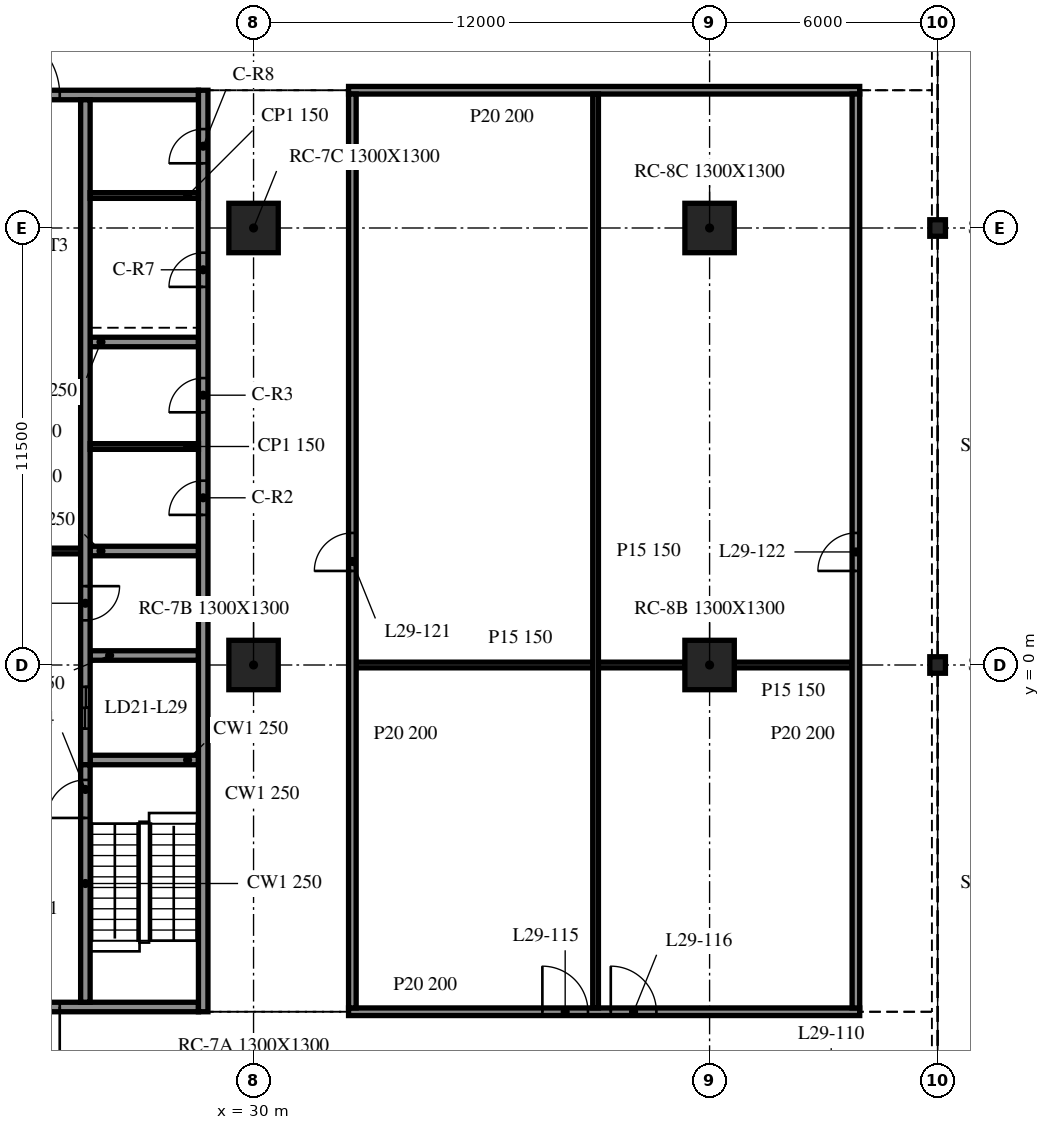
"""IFC4 building model, lengths in metres.
Left out: names, types, materials, properties, quantities, classifications, styles, units other than length and angle.
Written with IfcOpenShell. Run it as: python <this file> out.ifc"""

import sys

from ifc_helpers import new_model, si_unit, direction, frame, frame_2d, origin, origin_2d, place, context, subcontext, project, spatial, rectangle, i_section, extrude, element, fill, save


model = new_model("IFC4")
c1 = context("Model", 3, precision=1e-05, world=origin(), true_north=direction((0.0, 1.0)))
c2 = subcontext(c1, "Body", "Model", "MODEL_VIEW")
j1 = project(units=[si_unit("LENGTHUNIT", "METRE"), si_unit("PLANEANGLEUNIT", "RADIAN")], contexts=[c1])
p1 = place(None, origin())
s1 = spatial("IfcSite", under=j1, at=p1, CompositionType="ELEMENT")
p2 = place(p1, origin())
s2 = spatial("IfcBuilding", under=s1, at=p2, CompositionType="ELEMENT")
p3 = place(p2, frame((0.0, 0.0, 126.1)))
s3 = spatial("IfcBuildingStorey", under=s2, at=p3, CompositionType="ELEMENT", Elevation=126.1)
for number, where, z_axis, x_axis in (
    (1, (30.0, 0.0, -0.34), (0.0, 0.0, 1.0), (1.0, 0.0, 0.0)),
    (2, (30.0, 11.5, -0.34), (0.0, 0.0, 1.0), (1.0, 0.0, 0.0)),
    (3, (42.0, 0.0, -0.34), (0.0, 0.0, 1.0), (1.0, 0.0, 0.0)),
    (4, (42.0, 11.5, -0.34), (0.0, 0.0, 1.0), (1.0, 0.0, 0.0)),
):
    element("IfcColumn", number, at=place(p3, frame(where, z_axis=z_axis, x_axis=x_axis)), inside=s3, PredefinedType="COLUMN", context=c2, shape_type="SweptSolid", body=[
        extrude(rectangle(XDim=1.3, YDim=1.3, at=origin_2d()), origin(), (0.0, 0.0, 1.0), 4.1),
    ])
for number, where, z_axis, x_axis in (
    (5, (48.0, 0.0, -0.34), (0.0, 0.0, 1.0), (1.0, 0.0, 0.0)),
    (6, (48.0, 11.5, -0.34), (0.0, 0.0, 1.0), (1.0, 0.0, 0.0)),
):
    element("IfcColumn", number, at=place(p3, frame(where, z_axis=z_axis, x_axis=x_axis)), inside=s3, PredefinedType="COLUMN", context=c2, shape_type="SweptSolid", body=[
        extrude(i_section(OverallWidth=0.412, OverallDepth=0.434, WebThickness=0.036, FlangeThickness=0.057, at=origin_2d()), origin(), (0.0, 0.0, 1.0), 4.1),
    ])
p4 = place(p3, frame((28.675, -9.125, 0.0), z_axis=(0.0, 0.0, 1.0), x_axis=(0.0, 1.0, 0.0)))
e7 = element("IfcWall", 7, at=p4, inside=s3, PredefinedType="SOLIDWALL", context=c2, shape_type="SweptSolid", body=[
    extrude(rectangle(XDim=24.25, YDim=0.25, at=frame_2d((12.125, 0.0))), origin(), (0.0, 0.0, 1.0), 3.76),
])
p5 = place(p4, frame((13.075, 0.0, 0.0)))
e8 = element("IfcOpeningElement", 8, at=p5, cuts=e7, PredefinedType="OPENING", context=c2, shape_type="SweptSolid", body=[
    extrude(rectangle(XDim=0.9, YDim=2.1, at=frame_2d((0.45, 1.05))), frame((0.0, 0.135, 0.0), z_axis=(0.0, -1.0, 0.0), x_axis=(1.0, 0.0, 0.0)), (0.0, 0.0, 1.0), 0.27),
])
p6 = place(p4, frame((15.775, 0.0, 0.0)))
e9 = element("IfcOpeningElement", 9, at=p6, cuts=e7, PredefinedType="OPENING", context=c2, shape_type="SweptSolid", body=[
    extrude(rectangle(XDim=0.9, YDim=2.1, at=frame_2d((0.45, 1.05))), frame((0.0, 0.135, 0.0), z_axis=(0.0, -1.0, 0.0), x_axis=(1.0, 0.0, 0.0)), (0.0, 0.0, 1.0), 0.27),
])
p7 = place(p4, frame((19.075, 0.0, 0.0)))
e10 = element("IfcOpeningElement", 10, at=p7, cuts=e7, PredefinedType="OPENING", context=c2, shape_type="SweptSolid", body=[
    extrude(rectangle(XDim=0.9, YDim=2.1, at=frame_2d((0.45, 1.05))), frame((0.0, 0.135, 0.0), z_axis=(0.0, -1.0, 0.0), x_axis=(1.0, 0.0, 0.0)), (0.0, 0.0, 1.0), 0.27),
])
p8 = place(p4, frame((22.327, 0.0, 0.0)))
e11 = element("IfcOpeningElement", 11, at=p8, cuts=e7, PredefinedType="OPENING", context=c2, shape_type="SweptSolid", body=[
    extrude(rectangle(XDim=0.9, YDim=2.1, at=frame_2d((0.45, 1.05))), frame((0.0, 0.135, 0.0), z_axis=(0.0, -1.0, 0.0), x_axis=(1.0, 0.0, 0.0)), (0.0, 0.0, 1.0), 0.27),
])
p9 = place(p3, frame((28.55, -9.0, 0.0), z_axis=(0.0, 0.0, 1.0), x_axis=(-1.0, 0.0, 0.0)))
e12 = element("IfcWall", 12, at=p9, inside=s3, PredefinedType="SOLIDWALL", context=c2, shape_type="SweptSolid", body=[
    extrude(rectangle(XDim=9.1, YDim=0.25, at=frame_2d((4.55, 0.0))), origin(), (0.0, 0.0, 1.0), 3.76),
])
p10 = place(p9, frame((3.65, 0.0, 0.0)))
e13 = element("IfcOpeningElement", 13, at=p10, cuts=e12, PredefinedType="OPENING", context=c2, shape_type="SweptSolid", body=[
    extrude(rectangle(XDim=1.8, YDim=2.1, at=frame_2d((0.9, 1.05))), frame((0.0, 0.135, 0.0), z_axis=(0.0, -1.0, 0.0), x_axis=(1.0, 0.0, 0.0)), (0.0, 0.0, 1.0), 0.27),
])
p11 = place(p3, frame((19.45, 15.0, 0.0), z_axis=(0.0, 0.0, 1.0), x_axis=(1.0, 0.0, 0.0)))
e14 = element("IfcWall", 14, at=p11, inside=s3, PredefinedType="SOLIDWALL", context=c2, shape_type="SweptSolid", body=[
    extrude(rectangle(XDim=9.1, YDim=0.25, at=frame_2d((4.55, 0.0))), origin(), (0.0, 0.0, 1.0), 3.76),
])
p12 = place(p11, frame((3.65, 0.0, 0.0)))
e15 = element("IfcOpeningElement", 15, at=p12, cuts=e14, PredefinedType="OPENING", context=c2, shape_type="SweptSolid", body=[
    extrude(rectangle(XDim=1.8, YDim=2.1, at=frame_2d((0.9, 1.05))), frame((0.0, 0.135, 0.0), z_axis=(0.0, -1.0, 0.0), x_axis=(1.0, 0.0, 0.0)), (0.0, 0.0, 1.0), 0.27),
])
p13 = place(p3, frame((25.575, -8.875, 0.0), z_axis=(0.0, 0.0, 1.0), x_axis=(0.0, 1.0, 0.0)))
e16 = element("IfcWall", 16, at=p13, inside=s3, PredefinedType="SOLIDWALL", context=c2, shape_type="SweptSolid", body=[
    extrude(rectangle(XDim=6.25, YDim=0.25, at=frame_2d((3.125, 0.0))), origin(), (0.0, 0.0, 1.0), 3.76),
])
p14 = place(p13, frame((4.85, 0.0, 0.0)))
e17 = element("IfcOpeningElement", 17, at=p14, cuts=e16, PredefinedType="OPENING", context=c2, shape_type="SweptSolid", body=[
    extrude(rectangle(XDim=1.0, YDim=2.1, at=frame_2d((0.5, 1.05))), frame((0.0, 0.135, 0.0), z_axis=(0.0, -1.0, 0.0), x_axis=(1.0, 0.0, 0.0)), (0.0, 0.0, 1.0), 0.27),
])
p15 = place(p3, frame((25.575, 14.875, 0.0), z_axis=(0.0, 0.0, 1.0), x_axis=(0.0, -1.0, 0.0)))
e18 = element("IfcWall", 18, at=p15, inside=s3, PredefinedType="SOLIDWALL", context=c2, shape_type="SweptSolid", body=[
    extrude(rectangle(XDim=17.5, YDim=0.25, at=frame_2d((8.75, 0.0))), origin(), (0.0, 0.0, 1.0), 3.76),
])
p16 = place(p15, frame((15.45, 0.0, 0.0)))
e19 = element("IfcOpeningElement", 19, at=p16, cuts=e18, PredefinedType="OPENING", context=c2, shape_type="SweptSolid", body=[
    extrude(rectangle(XDim=1.1, YDim=2.1, at=frame_2d((0.55, 1.05))), frame((0.0, 0.135, 0.0), z_axis=(0.0, -1.0, 0.0), x_axis=(1.0, 0.0, 0.0)), (0.0, 0.0, 1.0), 0.27),
])
p17 = place(p15, frame((12.8, 0.0, 0.0)))
e20 = element("IfcOpeningElement", 20, at=p17, cuts=e18, PredefinedType="OPENING", context=c2, shape_type="SweptSolid", body=[
    extrude(rectangle(XDim=0.9, YDim=2.1, at=frame_2d((0.45, 1.05))), frame((0.0, 0.135, 0.0), z_axis=(0.0, -1.0, 0.0), x_axis=(1.0, 0.0, 0.0)), (0.0, 0.0, 1.0), 0.27),
])
for number, where, z_axis, x_axis in (
    (21, (25.7, -2.5, 0.0), (0.0, 0.0, 1.0), (1.0, 0.0, 0.0)),
    (22, (25.7, 0.25, 0.0), (0.0, 0.0, 1.0), (1.0, 0.0, 0.0)),
    (23, (25.7, 3.0, 0.0), (0.0, 0.0, 1.0), (1.0, 0.0, 0.0)),
    (24, (25.7, 8.5, 0.0), (0.0, 0.0, 1.0), (1.0, 0.0, 0.0)),
):
    element("IfcWall", number, at=place(p3, frame(where, z_axis=z_axis, x_axis=x_axis)), inside=s3, PredefinedType="SOLIDWALL", context=c2, shape_type="SweptSolid", body=[
        extrude(rectangle(XDim=2.85, YDim=0.25, at=frame_2d((1.425, 0.0))), origin(), (0.0, 0.0, 1.0), 3.76),
    ])
p18 = place(p3, frame((22.55, 3.0, 0.0), z_axis=(0.0, 0.0, 1.0), x_axis=(1.0, 0.0, 0.0)))
e25 = element("IfcWall", 25, at=p18, inside=s3, PredefinedType="PARTITIONING", context=c2, shape_type="SweptSolid", body=[
    extrude(rectangle(XDim=2.9, YDim=0.15, at=frame_2d((1.45, 0.0))), origin(), (0.0, 0.0, 1.0), 3.76),
])
for number, where, z_axis, x_axis in (
    (26, (25.7, 5.75, 0.0), (0.0, 0.0, 1.0), (1.0, 0.0, 0.0)),
    (27, (25.7, 12.355, 0.0), (0.0, 0.0, 1.0), (1.0, 0.0, 0.0)),
):
    element("IfcWall", number, at=place(p3, frame(where, z_axis=z_axis, x_axis=x_axis)), inside=s3, PredefinedType="PARTITIONING", context=c2, shape_type="SweptSolid", body=[
        extrude(rectangle(XDim=2.85, YDim=0.15, at=frame_2d((1.425, 0.0))), origin(), (0.0, 0.0, 1.0), 3.76),
    ])
p19 = place(p3, frame((32.5, -9.125, 0.0), z_axis=(0.0, 0.0, 1.0), x_axis=(1.0, 0.0, 0.0)))
e28 = element("IfcWall", 28, at=p19, inside=s3, PredefinedType="PARTITIONING", context=c2, shape_type="SweptSolid", body=[
    extrude(rectangle(XDim=13.45, YDim=0.2, at=frame_2d((6.725, 0.0))), origin(), (0.0, 0.0, 1.0), 3.76),
])
p20 = place(p19, frame((5.1, 0.0, 0.0)))
e29 = element("IfcOpeningElement", 29, at=p20, cuts=e28, PredefinedType="OPENING", context=c2, shape_type="SweptSolid", body=[
    extrude(rectangle(XDim=1.2, YDim=2.1, at=frame_2d((0.6, 1.05))), frame((0.0, 0.11, 0.0), z_axis=(0.0, -1.0, 0.0), x_axis=(1.0, 0.0, 0.0)), (0.0, 0.0, 1.0), 0.22),
])
p21 = place(p19, frame((6.9, 0.0, 0.0)))
e30 = element("IfcOpeningElement", 30, at=p21, cuts=e28, PredefinedType="OPENING", context=c2, shape_type="SweptSolid", body=[
    extrude(rectangle(XDim=1.2, YDim=2.1, at=frame_2d((0.6, 1.05))), frame((0.0, 0.11, 0.0), z_axis=(0.0, -1.0, 0.0), x_axis=(1.0, 0.0, 0.0)), (0.0, 0.0, 1.0), 0.22),
])
p22 = place(p3, frame((32.7, 0.0, 0.0), z_axis=(0.0, 0.0, 1.0), x_axis=(1.0, 0.0, 0.0)))
e31 = element("IfcWall", 31, at=p22, inside=s3, PredefinedType="PARTITIONING", context=c2, shape_type="SweptSolid", body=[
    extrude(rectangle(XDim=8.65, YDim=0.15, at=frame_2d((4.325, 0.0))), origin(), (0.0, 0.0, 1.0), 3.76),
])
p23 = place(p3, frame((42.65, 0.0, 0.0), z_axis=(0.0, 0.0, 1.0), x_axis=(1.0, 0.0, 0.0)))
e32 = element("IfcWall", 32, at=p23, inside=s3, PredefinedType="PARTITIONING", context=c2, shape_type="SweptSolid", body=[
    extrude(rectangle(XDim=3.1, YDim=0.15, at=frame_2d((1.55, 0.0))), origin(), (0.0, 0.0, 1.0), 3.76),
])
p24 = place(p3, frame((32.5, 15.125, 0.0), z_axis=(0.0, 0.0, 1.0), x_axis=(1.0, 0.0, 0.0)))
e33 = element("IfcWall", 33, at=p24, inside=s3, PredefinedType="PARTITIONING", context=c2, shape_type="SweptSolid", body=[
    extrude(rectangle(XDim=13.45, YDim=0.2, at=frame_2d((6.725, 0.0))), origin(), (0.0, 0.0, 1.0), 3.76),
])
p25 = place(p3, frame((32.6, -9.025, 0.0), z_axis=(0.0, 0.0, 1.0), x_axis=(0.0, 1.0, 0.0)))
e34 = element("IfcWall", 34, at=p25, inside=s3, PredefinedType="PARTITIONING", context=c2, shape_type="SweptSolid", body=[
    extrude(rectangle(XDim=24.05, YDim=0.2, at=frame_2d((12.025, 0.0))), origin(), (0.0, 0.0, 1.0), 3.76),
])
p26 = place(p25, frame((11.5, 0.0, 0.0)))
e35 = element("IfcOpeningElement", 35, at=p26, cuts=e34, PredefinedType="OPENING", context=c2, shape_type="SweptSolid", body=[
    extrude(rectangle(XDim=1.0, YDim=2.1, at=frame_2d((0.5, 1.05))), frame((0.0, 0.11, 0.0), z_axis=(0.0, -1.0, 0.0), x_axis=(1.0, 0.0, 0.0)), (0.0, 0.0, 1.0), 0.22),
])
p27 = place(p3, frame((39.0, -9.025, 0.0), z_axis=(0.0, 0.0, 1.0), x_axis=(0.0, 1.0, 0.0)))
e36 = element("IfcWall", 36, at=p27, inside=s3, PredefinedType="PARTITIONING", context=c2, shape_type="SweptSolid", body=[
    extrude(rectangle(XDim=24.05, YDim=0.15, at=frame_2d((12.025, 0.0))), origin(), (0.0, 0.0, 1.0), 3.76),
])
p28 = place(p3, frame((45.85, -9.025, 0.0), z_axis=(0.0, 0.0, 1.0), x_axis=(0.0, 1.0, 0.0)))
e37 = element("IfcWall", 37, at=p28, inside=s3, PredefinedType="PARTITIONING", context=c2, shape_type="SweptSolid", body=[
    extrude(rectangle(XDim=24.05, YDim=0.2, at=frame_2d((12.025, 0.0))), origin(), (0.0, 0.0, 1.0), 3.76),
])
p29 = place(p28, frame((11.5, 0.0, 0.0)))
e38 = element("IfcOpeningElement", 38, at=p29, cuts=e37, PredefinedType="OPENING", context=c2, shape_type="SweptSolid", body=[
    extrude(rectangle(XDim=1.0, YDim=2.1, at=frame_2d((0.5, 1.05))), frame((0.0, 0.11, 0.0), z_axis=(0.0, -1.0, 0.0), x_axis=(1.0, 0.0, 0.0)), (0.0, 0.0, 1.0), 0.22),
])
p30 = place(p10, origin())
e39 = element("IfcDoor", 39, at=p30, inside=s3, OperationType="DOUBLE_DOOR_SINGLE_SWING", PredefinedType="DOOR", context=c2, shape_type="SweptSolid", body=[
    extrude(rectangle(XDim=1.8, YDim=2.1, at=frame_2d((0.9, 1.05))), frame((0.0, 0.025, 0.0), z_axis=(0.0, -1.0, 0.0), x_axis=(1.0, 0.0, 0.0)), (0.0, 0.0, 1.0), 0.05),
])
fill(e13, e39)
p31 = place(p12, origin())
e40 = element("IfcDoor", 40, at=p31, inside=s3, OperationType="DOUBLE_DOOR_SINGLE_SWING", PredefinedType="DOOR", context=c2, shape_type="SweptSolid", body=[
    extrude(rectangle(XDim=1.8, YDim=2.1, at=frame_2d((0.9, 1.05))), frame((0.0, 0.025, 0.0), z_axis=(0.0, -1.0, 0.0), x_axis=(1.0, 0.0, 0.0)), (0.0, 0.0, 1.0), 0.05),
])
fill(e15, e40)
p32 = place(p16, origin())
e41 = element("IfcDoor", 41, at=p32, inside=s3, OperationType="DOUBLE_DOOR_SLIDING", PredefinedType="DOOR", context=c2, shape_type="SweptSolid", body=[
    extrude(rectangle(XDim=1.1, YDim=2.1, at=frame_2d((0.55, 1.05))), frame((0.0, 0.025, 0.0), z_axis=(0.0, -1.0, 0.0), x_axis=(1.0, 0.0, 0.0)), (0.0, 0.0, 1.0), 0.05),
])
fill(e19, e41)
p33 = place(p17, origin())
e42 = element("IfcDoor", 42, at=p33, inside=s3, OperationType="SINGLE_SWING_LEFT", PredefinedType="DOOR", context=c2, shape_type="SweptSolid", body=[
    extrude(rectangle(XDim=0.9, YDim=2.1, at=frame_2d((0.45, 1.05))), frame((0.0, 0.025, 0.0), z_axis=(0.0, -1.0, 0.0), x_axis=(1.0, 0.0, 0.0)), (0.0, 0.0, 1.0), 0.05),
])
fill(e20, e42)
p34 = place(p5, origin())
e43 = element("IfcDoor", 43, at=p34, inside=s3, OperationType="SINGLE_SWING_RIGHT", PredefinedType="DOOR", context=c2, shape_type="SweptSolid", body=[
    extrude(rectangle(XDim=0.9, YDim=2.1, at=frame_2d((0.45, 1.05))), frame((0.0, 0.025, 0.0), z_axis=(0.0, -1.0, 0.0), x_axis=(1.0, 0.0, 0.0)), (0.0, 0.0, 1.0), 0.05),
])
fill(e8, e43)
p35 = place(p6, origin())
e44 = element("IfcDoor", 44, at=p35, inside=s3, OperationType="SINGLE_SWING_LEFT", PredefinedType="DOOR", context=c2, shape_type="SweptSolid", body=[
    extrude(rectangle(XDim=0.9, YDim=2.1, at=frame_2d((0.45, 1.05))), frame((0.0, 0.025, 0.0), z_axis=(0.0, -1.0, 0.0), x_axis=(1.0, 0.0, 0.0)), (0.0, 0.0, 1.0), 0.05),
])
fill(e9, e44)
p36 = place(p7, origin())
e45 = element("IfcDoor", 45, at=p36, inside=s3, OperationType="SINGLE_SWING_LEFT", PredefinedType="DOOR", context=c2, shape_type="SweptSolid", body=[
    extrude(rectangle(XDim=0.9, YDim=2.1, at=frame_2d((0.45, 1.05))), frame((0.0, 0.025, 0.0), z_axis=(0.0, -1.0, 0.0), x_axis=(1.0, 0.0, 0.0)), (0.0, 0.0, 1.0), 0.05),
])
fill(e10, e45)
p37 = place(p8, origin())
e46 = element("IfcDoor", 46, at=p37, inside=s3, OperationType="SINGLE_SWING_RIGHT", PredefinedType="DOOR", context=c2, shape_type="SweptSolid", body=[
    extrude(rectangle(XDim=0.9, YDim=2.1, at=frame_2d((0.45, 1.05))), frame((0.0, 0.025, 0.0), z_axis=(0.0, -1.0, 0.0), x_axis=(1.0, 0.0, 0.0)), (0.0, 0.0, 1.0), 0.05),
])
fill(e11, e46)
p38 = place(p14, origin())
e47 = element("IfcDoor", 47, at=p38, inside=s3, OperationType="SINGLE_SWING_RIGHT", PredefinedType="DOOR", context=c2, shape_type="SweptSolid", body=[
    extrude(rectangle(XDim=1.0, YDim=2.1, at=frame_2d((0.5, 1.05))), frame((0.0, 0.025, 0.0), z_axis=(0.0, -1.0, 0.0), x_axis=(1.0, 0.0, 0.0)), (0.0, 0.0, 1.0), 0.05),
])
fill(e17, e47)
p39 = place(p20, origin())
e48 = element("IfcDoor", 48, at=p39, inside=s3, OperationType="SINGLE_SWING_LEFT", PredefinedType="DOOR", context=c2, shape_type="SweptSolid", body=[
    extrude(rectangle(XDim=1.2, YDim=2.1, at=frame_2d((0.6, 1.05))), frame((0.0, 0.025, 0.0), z_axis=(0.0, -1.0, 0.0), x_axis=(1.0, 0.0, 0.0)), (0.0, 0.0, 1.0), 0.05),
])
fill(e29, e48)
p40 = place(p21, origin())
e49 = element("IfcDoor", 49, at=p40, inside=s3, OperationType="SINGLE_SWING_RIGHT", PredefinedType="DOOR", context=c2, shape_type="SweptSolid", body=[
    extrude(rectangle(XDim=1.2, YDim=2.1, at=frame_2d((0.6, 1.05))), frame((0.0, 0.025, 0.0), z_axis=(0.0, -1.0, 0.0), x_axis=(1.0, 0.0, 0.0)), (0.0, 0.0, 1.0), 0.05),
])
fill(e30, e49)
p41 = place(p26, origin())
e50 = element("IfcDoor", 50, at=p41, inside=s3, OperationType="SINGLE_SWING_RIGHT", PredefinedType="DOOR", context=c2, shape_type="SweptSolid", body=[
    extrude(rectangle(XDim=1.0, YDim=2.1, at=frame_2d((0.5, 1.05))), frame((0.0, 0.025, 0.0), z_axis=(0.0, -1.0, 0.0), x_axis=(1.0, 0.0, 0.0)), (0.0, 0.0, 1.0), 0.05),
])
fill(e35, e50)
p42 = place(p29, origin())
e51 = element("IfcDoor", 51, at=p42, inside=s3, OperationType="SINGLE_SWING_LEFT", PredefinedType="DOOR", context=c2, shape_type="SweptSolid", body=[
    extrude(rectangle(XDim=1.0, YDim=2.1, at=frame_2d((0.5, 1.05))), frame((0.0, 0.025, 0.0), z_axis=(0.0, -1.0, 0.0), x_axis=(1.0, 0.0, 0.0)), (0.0, 0.0, 1.0), 0.05),
])
fill(e38, e51)
save(model, sys.argv[1])
